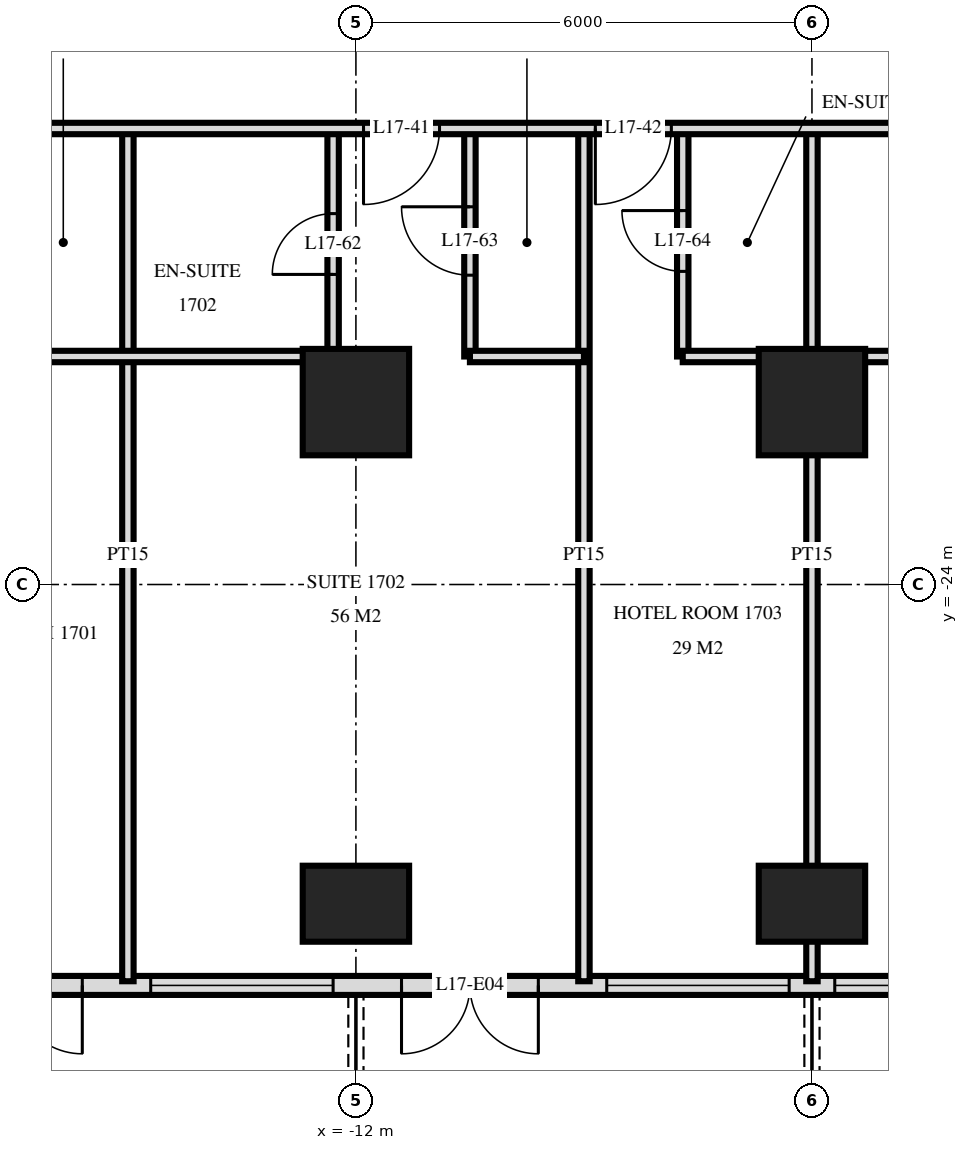
"""IFC4 building model, lengths in metres.
Left out: names, types, materials, properties, quantities, classifications, styles, units other than length and angle.
Written with IfcOpenShell. Run it as: python <this file> out.ifc"""

import sys

from ifc_helpers import new_model, si_unit, direction, frame, frame_2d, origin, origin_2d, place, context, subcontext, project, spatial, rectangle, extrude, element, fill, save


model = new_model("IFC4")
c1 = context("Model", 3, precision=1e-05, world=origin(), true_north=direction((0.0, 1.0)))
c2 = subcontext(c1, "Body", "Model", "MODEL_VIEW")
j1 = project(units=[si_unit("LENGTHUNIT", "METRE"), si_unit("PLANEANGLEUNIT", "RADIAN")], contexts=[c1])
p1 = place(None, origin())
s1 = spatial("IfcSite", under=j1, at=p1, CompositionType="ELEMENT")
p2 = place(p1, origin())
s2 = spatial("IfcBuilding", under=s1, at=p2, CompositionType="ELEMENT")
p3 = place(p2, frame((0.0, 0.0, 70.8)))
s3 = spatial("IfcBuildingStorey", under=s2, at=p3, CompositionType="ELEMENT", Elevation=70.8)
p4 = place(p3, frame((-12.0, -28.2, 0.0), z_axis=(0.0, 0.0, 1.0), x_axis=(1.0, 0.0, 0.0)))
e1 = element("IfcColumn", 1, at=p4, inside=s3, PredefinedType="COLUMN", context=c2, shape_type="SweptSolid", body=[
    extrude(rectangle(XDim=1.4, YDim=1.0, at=origin_2d()), origin(), (0.0, 0.0, 1.0), 3.6),
])
p5 = place(p3, frame((-12.0, -21.6, 0.0), z_axis=(0.0, 0.0, 1.0), x_axis=(1.0, 0.0, 0.0)))
e2 = element("IfcColumn", 2, at=p5, inside=s3, PredefinedType="COLUMN", context=c2, shape_type="SweptSolid", body=[
    extrude(rectangle(XDim=1.4, YDim=1.4, at=origin_2d()), origin(), (0.0, 0.0, 1.0), 3.6),
])
p6 = place(p3, frame((-6.0, -28.2, 0.0), z_axis=(0.0, 0.0, 1.0), x_axis=(1.0, 0.0, 0.0)))
e3 = element("IfcColumn", 3, at=p6, inside=s3, PredefinedType="COLUMN", context=c2, shape_type="SweptSolid", body=[
    extrude(rectangle(XDim=1.4, YDim=1.0, at=origin_2d()), origin(), (0.0, 0.0, 1.0), 3.6),
])
p7 = place(p3, frame((-6.0, -21.6, 0.0), z_axis=(0.0, 0.0, 1.0), x_axis=(1.0, 0.0, 0.0)))
e4 = element("IfcColumn", 4, at=p7, inside=s3, PredefinedType="COLUMN", context=c2, shape_type="SweptSolid", body=[
    extrude(rectangle(XDim=1.4, YDim=1.4, at=origin_2d()), origin(), (0.0, 0.0, 1.0), 3.6),
])
p8 = place(p3, frame((-28.775, -29.275, 0.0), z_axis=(0.0, 0.0, 1.0), x_axis=(1.0, 0.0, 0.0)))
e5 = element("IfcWall", 5, at=p8, inside=s3, PredefinedType="SOLIDWALL", context=c2, shape_type="SweptSolid", body=[
    extrude(rectangle(XDim=57.551, YDim=0.25, at=frame_2d((28.775, 0.0))), origin(), (0.0, 0.0, 1.0), 3.32),
])
p9 = place(p8, frame((0.575, 0.0, 0.0)))
e6 = element("IfcOpeningElement", 6, at=p9, cuts=e5, PredefinedType="OPENING", context=c2, shape_type="SweptSolid", body=[
    extrude(rectangle(XDim=1.8, YDim=2.4, at=frame_2d((0.9, 1.2))), frame((0.0, 0.135, 0.0), z_axis=(0.0, -1.0, 0.0), x_axis=(1.0, 0.0, 0.0)), (0.0, 0.0, 1.0), 0.27),
])
p10 = place(p8, frame((5.075, 0.0, 0.3)))
e7 = element("IfcOpeningElement", 7, at=p10, cuts=e5, PredefinedType="OPENING", context=c2, shape_type="SweptSolid", body=[
    extrude(rectangle(XDim=2.4, YDim=2.1, at=frame_2d((1.2, 1.05))), frame((0.0, 0.135, 0.0), z_axis=(0.0, -1.0, 0.0), x_axis=(1.0, 0.0, 0.0)), (0.0, 0.0, 1.0), 0.27),
])
p11 = place(p8, frame((8.375, 0.0, 0.0)))
e8 = element("IfcOpeningElement", 8, at=p11, cuts=e5, PredefinedType="OPENING", context=c2, shape_type="SweptSolid", body=[
    extrude(rectangle(XDim=1.8, YDim=2.4, at=frame_2d((0.9, 1.2))), frame((0.0, 0.135, 0.0), z_axis=(0.0, -1.0, 0.0), x_axis=(1.0, 0.0, 0.0)), (0.0, 0.0, 1.0), 0.27),
])
p12 = place(p8, frame((11.375, 0.0, 0.0)))
e9 = element("IfcOpeningElement", 9, at=p12, cuts=e5, PredefinedType="OPENING", context=c2, shape_type="SweptSolid", body=[
    extrude(rectangle(XDim=1.8, YDim=2.4, at=frame_2d((0.9, 1.2))), frame((0.0, 0.135, 0.0), z_axis=(0.0, -1.0, 0.0), x_axis=(1.0, 0.0, 0.0)), (0.0, 0.0, 1.0), 0.27),
])
p13 = place(p8, frame((14.075, 0.0, 0.3)))
e10 = element("IfcOpeningElement", 10, at=p13, cuts=e5, PredefinedType="OPENING", context=c2, shape_type="SweptSolid", body=[
    extrude(rectangle(XDim=2.4, YDim=2.1, at=frame_2d((1.2, 1.05))), frame((0.0, 0.135, 0.0), z_axis=(0.0, -1.0, 0.0), x_axis=(1.0, 0.0, 0.0)), (0.0, 0.0, 1.0), 0.27),
])
p14 = place(p8, frame((17.375, 0.0, 0.0)))
e11 = element("IfcOpeningElement", 11, at=p14, cuts=e5, PredefinedType="OPENING", context=c2, shape_type="SweptSolid", body=[
    extrude(rectangle(XDim=1.8, YDim=2.4, at=frame_2d((0.9, 1.2))), frame((0.0, 0.135, 0.0), z_axis=(0.0, -1.0, 0.0), x_axis=(1.0, 0.0, 0.0)), (0.0, 0.0, 1.0), 0.27),
])
p15 = place(p8, frame((20.075, 0.0, 0.3)))
e12 = element("IfcOpeningElement", 12, at=p15, cuts=e5, PredefinedType="OPENING", context=c2, shape_type="SweptSolid", body=[
    extrude(rectangle(XDim=2.4, YDim=2.1, at=frame_2d((1.2, 1.05))), frame((0.0, 0.135, 0.0), z_axis=(0.0, -1.0, 0.0), x_axis=(1.0, 0.0, 0.0)), (0.0, 0.0, 1.0), 0.27),
])
p16 = place(p8, frame((23.075, 0.0, 0.3)))
e13 = element("IfcOpeningElement", 13, at=p16, cuts=e5, PredefinedType="OPENING", context=c2, shape_type="SweptSolid", body=[
    extrude(rectangle(XDim=2.4, YDim=2.1, at=frame_2d((1.2, 1.05))), frame((0.0, 0.135, 0.0), z_axis=(0.0, -1.0, 0.0), x_axis=(1.0, 0.0, 0.0)), (0.0, 0.0, 1.0), 0.27),
])
p17 = place(p8, frame((26.375, 0.0, 0.0)))
e14 = element("IfcOpeningElement", 14, at=p17, cuts=e5, PredefinedType="OPENING", context=c2, shape_type="SweptSolid", body=[
    extrude(rectangle(XDim=1.8, YDim=2.4, at=frame_2d((0.9, 1.2))), frame((0.0, 0.135, 0.0), z_axis=(0.0, -1.0, 0.0), x_axis=(1.0, 0.0, 0.0)), (0.0, 0.0, 1.0), 0.27),
])
p18 = place(p8, frame((29.375, 0.0, 0.0)))
e15 = element("IfcOpeningElement", 15, at=p18, cuts=e5, PredefinedType="OPENING", context=c2, shape_type="SweptSolid", body=[
    extrude(rectangle(XDim=1.8, YDim=2.4, at=frame_2d((0.9, 1.2))), frame((0.0, 0.135, 0.0), z_axis=(0.0, -1.0, 0.0), x_axis=(1.0, 0.0, 0.0)), (0.0, 0.0, 1.0), 0.27),
])
p19 = place(p8, frame((32.075, 0.0, 0.3)))
e16 = element("IfcOpeningElement", 16, at=p19, cuts=e5, PredefinedType="OPENING", context=c2, shape_type="SweptSolid", body=[
    extrude(rectangle(XDim=2.4, YDim=2.1, at=frame_2d((1.2, 1.05))), frame((0.0, 0.135, 0.0), z_axis=(0.0, -1.0, 0.0), x_axis=(1.0, 0.0, 0.0)), (0.0, 0.0, 1.0), 0.27),
])
p20 = place(p8, frame((35.375, 0.0, 0.0)))
e17 = element("IfcOpeningElement", 17, at=p20, cuts=e5, PredefinedType="OPENING", context=c2, shape_type="SweptSolid", body=[
    extrude(rectangle(XDim=1.8, YDim=2.4, at=frame_2d((0.9, 1.2))), frame((0.0, 0.135, 0.0), z_axis=(0.0, -1.0, 0.0), x_axis=(1.0, 0.0, 0.0)), (0.0, 0.0, 1.0), 0.27),
])
p21 = place(p8, frame((38.075, 0.0, 0.3)))
e18 = element("IfcOpeningElement", 18, at=p21, cuts=e5, PredefinedType="OPENING", context=c2, shape_type="SweptSolid", body=[
    extrude(rectangle(XDim=2.4, YDim=2.1, at=frame_2d((1.2, 1.05))), frame((0.0, 0.135, 0.0), z_axis=(0.0, -1.0, 0.0), x_axis=(1.0, 0.0, 0.0)), (0.0, 0.0, 1.0), 0.27),
])
p22 = place(p8, frame((41.075, 0.0, 0.3)))
e19 = element("IfcOpeningElement", 19, at=p22, cuts=e5, PredefinedType="OPENING", context=c2, shape_type="SweptSolid", body=[
    extrude(rectangle(XDim=2.4, YDim=2.1, at=frame_2d((1.2, 1.05))), frame((0.0, 0.135, 0.0), z_axis=(0.0, -1.0, 0.0), x_axis=(1.0, 0.0, 0.0)), (0.0, 0.0, 1.0), 0.27),
])
p23 = place(p8, frame((44.375, 0.0, 0.0)))
e20 = element("IfcOpeningElement", 20, at=p23, cuts=e5, PredefinedType="OPENING", context=c2, shape_type="SweptSolid", body=[
    extrude(rectangle(XDim=1.8, YDim=2.4, at=frame_2d((0.9, 1.2))), frame((0.0, 0.135, 0.0), z_axis=(0.0, -1.0, 0.0), x_axis=(1.0, 0.0, 0.0)), (0.0, 0.0, 1.0), 0.27),
])
p24 = place(p8, frame((47.075, 0.0, 0.3)))
e21 = element("IfcOpeningElement", 21, at=p24, cuts=e5, PredefinedType="OPENING", context=c2, shape_type="SweptSolid", body=[
    extrude(rectangle(XDim=2.4, YDim=2.1, at=frame_2d((1.2, 1.05))), frame((0.0, 0.135, 0.0), z_axis=(0.0, -1.0, 0.0), x_axis=(1.0, 0.0, 0.0)), (0.0, 0.0, 1.0), 0.27),
])
p25 = place(p8, frame((50.375, 0.0, 0.0)))
e22 = element("IfcOpeningElement", 22, at=p25, cuts=e5, PredefinedType="OPENING", context=c2, shape_type="SweptSolid", body=[
    extrude(rectangle(XDim=1.8, YDim=2.4, at=frame_2d((0.9, 1.2))), frame((0.0, 0.135, 0.0), z_axis=(0.0, -1.0, 0.0), x_axis=(1.0, 0.0, 0.0)), (0.0, 0.0, 1.0), 0.27),
])
p26 = place(p8, frame((53.375, 0.0, 0.0)))
e23 = element("IfcOpeningElement", 23, at=p26, cuts=e5, PredefinedType="OPENING", context=c2, shape_type="SweptSolid", body=[
    extrude(rectangle(XDim=1.8, YDim=2.4, at=frame_2d((0.9, 1.2))), frame((0.0, 0.135, 0.0), z_axis=(0.0, -1.0, 0.0), x_axis=(1.0, 0.0, 0.0)), (0.0, 0.0, 1.0), 0.27),
])
p27 = place(p3, frame((-6.0, -29.22, 0.0), z_axis=(0.0, 0.0, 1.0), x_axis=(0.0, 1.0, 0.0)))
e24 = element("IfcWall", 24, at=p27, inside=s3, PredefinedType="PARTITIONING", context=c2, shape_type="SweptSolid", body=[
    extrude(rectangle(XDim=11.22, YDim=0.15, at=frame_2d((5.61, 0.0))), origin(), (0.0, 0.0, 1.0), 3.32),
])
p28 = place(p3, frame((-7.7, -21.0, 0.0), z_axis=(0.0, 0.0, 1.0), x_axis=(0.0, 1.0, 0.0)))
e25 = element("IfcWall", 25, at=p28, inside=s3, PredefinedType="PARTITIONING", context=c2, shape_type="SweptSolid", body=[
    extrude(rectangle(XDim=3.0, YDim=0.15, at=frame_2d((1.5, 0.0))), origin(), (0.0, 0.0, 1.0), 3.32),
])
p29 = place(p28, frame((1.12, 0.0, 0.0)))
e26 = element("IfcOpeningElement", 26, at=p29, cuts=e25, PredefinedType="OPENING", context=c2, shape_type="SweptSolid", body=[
    extrude(rectangle(XDim=0.8, YDim=2.1, at=frame_2d((0.4, 1.05))), frame((0.0, 0.085, 0.0), z_axis=(0.0, -1.0, 0.0), x_axis=(1.0, 0.0, 0.0)), (0.0, 0.0, 1.0), 0.17),
])
p30 = place(p3, frame((-9.0, -29.22, 0.0), z_axis=(0.0, 0.0, 1.0), x_axis=(0.0, 1.0, 0.0)))
e27 = element("IfcWall", 27, at=p30, inside=s3, PredefinedType="PARTITIONING", context=c2, shape_type="SweptSolid", body=[
    extrude(rectangle(XDim=11.22, YDim=0.15, at=frame_2d((5.61, 0.0))), origin(), (0.0, 0.0, 1.0), 3.32),
])
p31 = place(p3, frame((-10.5, -21.0, 0.0), z_axis=(0.0, 0.0, 1.0), x_axis=(0.0, 1.0, 0.0)))
e28 = element("IfcWall", 28, at=p31, inside=s3, PredefinedType="PARTITIONING", context=c2, shape_type="SweptSolid", body=[
    extrude(rectangle(XDim=3.0, YDim=0.15, at=frame_2d((1.5, 0.0))), origin(), (0.0, 0.0, 1.0), 3.32),
])
p32 = place(p31, frame((1.07, 0.0, 0.0)))
e29 = element("IfcOpeningElement", 29, at=p32, cuts=e28, PredefinedType="OPENING", context=c2, shape_type="SweptSolid", body=[
    extrude(rectangle(XDim=0.9, YDim=2.1, at=frame_2d((0.45, 1.05))), frame((0.0, 0.085, 0.0), z_axis=(0.0, -1.0, 0.0), x_axis=(1.0, 0.0, 0.0)), (0.0, 0.0, 1.0), 0.17),
])
p33 = place(p3, frame((-12.3, -21.0, 0.0), z_axis=(0.0, 0.0, 1.0), x_axis=(0.0, 1.0, 0.0)))
e30 = element("IfcWall", 30, at=p33, inside=s3, PredefinedType="PARTITIONING", context=c2, shape_type="SweptSolid", body=[
    extrude(rectangle(XDim=3.0, YDim=0.15, at=frame_2d((1.5, 0.0))), origin(), (0.0, 0.0, 1.0), 3.32),
])
p34 = place(p33, frame((1.08, 0.0, 0.0)))
e31 = element("IfcOpeningElement", 31, at=p34, cuts=e30, PredefinedType="OPENING", context=c2, shape_type="SweptSolid", body=[
    extrude(rectangle(XDim=0.8, YDim=2.1, at=frame_2d((0.4, 1.05))), frame((0.0, 0.085, 0.0), z_axis=(0.0, -1.0, 0.0), x_axis=(1.0, 0.0, 0.0)), (0.0, 0.0, 1.0), 0.17),
])
p35 = place(p3, frame((-15.0, -29.22, 0.0), z_axis=(0.0, 0.0, 1.0), x_axis=(0.0, 1.0, 0.0)))
e32 = element("IfcWall", 32, at=p35, inside=s3, PredefinedType="PARTITIONING", context=c2, shape_type="SweptSolid", body=[
    extrude(rectangle(XDim=11.22, YDim=0.15, at=frame_2d((5.61, 0.0))), origin(), (0.0, 0.0, 1.0), 3.32),
])
p36 = place(p3, frame((-16.7, -21.0, 0.0), z_axis=(0.0, 0.0, 1.0), x_axis=(1.0, 0.0, 0.0)))
e33 = element("IfcWall", 33, at=p36, inside=s3, PredefinedType="PARTITIONING", context=c2, shape_type="SweptSolid", body=[
    extrude(rectangle(XDim=4.4, YDim=0.15, at=frame_2d((2.2, 0.0))), origin(), (0.0, 0.0, 1.0), 3.32),
])
p37 = place(p3, frame((-10.5, -21.0, 0.0), z_axis=(0.0, 0.0, 1.0), x_axis=(1.0, 0.0, 0.0)))
e34 = element("IfcWall", 34, at=p37, inside=s3, PredefinedType="PARTITIONING", context=c2, shape_type="SweptSolid", body=[
    extrude(rectangle(XDim=1.5, YDim=0.15, at=frame_2d((0.75, 0.0))), origin(), (0.0, 0.0, 1.0), 3.32),
])
p38 = place(p3, frame((-7.7, -21.0, 0.0), z_axis=(0.0, 0.0, 1.0), x_axis=(1.0, 0.0, 0.0)))
e35 = element("IfcWall", 35, at=p38, inside=s3, PredefinedType="PARTITIONING", context=c2, shape_type="SweptSolid", body=[
    extrude(rectangle(XDim=4.4, YDim=0.15, at=frame_2d((2.2, 0.0))), origin(), (0.0, 0.0, 1.0), 3.32),
])
p39 = place(p3, frame((-33.12, -18.0, 0.0), z_axis=(0.0, 0.0, 1.0), x_axis=(1.0, 0.0, 0.0)))
e36 = element("IfcWall", 36, at=p39, inside=s3, PredefinedType="PARTITIONING", context=c2, shape_type="SweptSolid", body=[
    extrude(rectangle(XDim=66.24, YDim=0.15, at=frame_2d((33.12, 0.0))), origin(), (0.0, 0.0, 1.0), 3.32),
])
p40 = place(p39, frame((15.27, 0.0, 0.0)))
e37 = element("IfcOpeningElement", 37, at=p40, cuts=e36, PredefinedType="OPENING", context=c2, shape_type="SweptSolid", body=[
    extrude(rectangle(XDim=1.0, YDim=2.1, at=frame_2d((0.5, 1.05))), frame((0.0, 0.085, 0.0), z_axis=(0.0, -1.0, 0.0), x_axis=(1.0, 0.0, 0.0)), (0.0, 0.0, 1.0), 0.17),
])
p41 = place(p39, frame((21.22, 0.0, 0.0)))
e38 = element("IfcOpeningElement", 38, at=p41, cuts=e36, PredefinedType="OPENING", context=c2, shape_type="SweptSolid", body=[
    extrude(rectangle(XDim=1.0, YDim=2.1, at=frame_2d((0.5, 1.05))), frame((0.0, 0.085, 0.0), z_axis=(0.0, -1.0, 0.0), x_axis=(1.0, 0.0, 0.0)), (0.0, 0.0, 1.0), 0.17),
])
p42 = place(p39, frame((24.27, 0.0, 0.0)))
e39 = element("IfcOpeningElement", 39, at=p42, cuts=e36, PredefinedType="OPENING", context=c2, shape_type="SweptSolid", body=[
    extrude(rectangle(XDim=1.0, YDim=2.1, at=frame_2d((0.5, 1.05))), frame((0.0, 0.085, 0.0), z_axis=(0.0, -1.0, 0.0), x_axis=(1.0, 0.0, 0.0)), (0.0, 0.0, 1.0), 0.17),
])
p43 = place(p39, frame((30.97, 0.0, 0.0)))
e40 = element("IfcOpeningElement", 40, at=p43, cuts=e36, PredefinedType="OPENING", context=c2, shape_type="SweptSolid", body=[
    extrude(rectangle(XDim=1.0, YDim=2.1, at=frame_2d((0.5, 1.05))), frame((0.0, 0.085, 0.0), z_axis=(0.0, -1.0, 0.0), x_axis=(1.0, 0.0, 0.0)), (0.0, 0.0, 1.0), 0.17),
])
p44 = place(p39, frame((40.42, 0.0, 0.0)))
e41 = element("IfcOpeningElement", 41, at=p44, cuts=e36, PredefinedType="OPENING", context=c2, shape_type="SweptSolid", body=[
    extrude(rectangle(XDim=1.0, YDim=2.1, at=frame_2d((0.5, 1.05))), frame((0.0, 0.085, 0.0), z_axis=(0.0, -1.0, 0.0), x_axis=(1.0, 0.0, 0.0)), (0.0, 0.0, 1.0), 0.17),
])
p45 = place(p39, frame((43.97, 0.0, 0.0)))
e42 = element("IfcOpeningElement", 42, at=p45, cuts=e36, PredefinedType="OPENING", context=c2, shape_type="SweptSolid", body=[
    extrude(rectangle(XDim=1.0, YDim=2.1, at=frame_2d((0.5, 1.05))), frame((0.0, 0.085, 0.0), z_axis=(0.0, -1.0, 0.0), x_axis=(1.0, 0.0, 0.0)), (0.0, 0.0, 1.0), 0.17),
])
p46 = place(p39, frame((45.52, 0.0, 0.0)))
e43 = element("IfcOpeningElement", 43, at=p46, cuts=e36, PredefinedType="OPENING", context=c2, shape_type="SweptSolid", body=[
    extrude(rectangle(XDim=1.0, YDim=2.1, at=frame_2d((0.5, 1.05))), frame((0.0, 0.085, 0.0), z_axis=(0.0, -1.0, 0.0), x_axis=(1.0, 0.0, 0.0)), (0.0, 0.0, 1.0), 0.17),
])
p47 = place(p39, frame((52.97, 0.0, 0.0)))
e44 = element("IfcOpeningElement", 44, at=p47, cuts=e36, PredefinedType="OPENING", context=c2, shape_type="SweptSolid", body=[
    extrude(rectangle(XDim=1.0, YDim=2.1, at=frame_2d((0.5, 1.05))), frame((0.0, 0.085, 0.0), z_axis=(0.0, -1.0, 0.0), x_axis=(1.0, 0.0, 0.0)), (0.0, 0.0, 1.0), 0.17),
])
p48 = place(p39, frame((54.27, 0.0, 0.0)))
e45 = element("IfcOpeningElement", 45, at=p48, cuts=e36, PredefinedType="OPENING", context=c2, shape_type="SweptSolid", body=[
    extrude(rectangle(XDim=1.0, YDim=2.1, at=frame_2d((0.5, 1.05))), frame((0.0, 0.085, 0.0), z_axis=(0.0, -1.0, 0.0), x_axis=(1.0, 0.0, 0.0)), (0.0, 0.0, 1.0), 0.17),
])
p49 = place(p39, frame((13.42, 0.0, 0.0)))
e46 = element("IfcOpeningElement", 46, at=p49, cuts=e36, PredefinedType="OPENING", context=c2, shape_type="SweptSolid", body=[
    extrude(rectangle(XDim=1.0, YDim=2.1, at=frame_2d((0.5, 1.05))), frame((0.0, 0.085, 0.0), z_axis=(0.0, -1.0, 0.0), x_axis=(1.0, 0.0, 0.0)), (0.0, 0.0, 1.0), 0.17),
])
p50 = place(p39, frame((60.82, 0.0, 0.0)))
e47 = element("IfcOpeningElement", 47, at=p50, cuts=e36, PredefinedType="OPENING", context=c2, shape_type="SweptSolid", body=[
    extrude(rectangle(XDim=1.0, YDim=2.1, at=frame_2d((0.5, 1.05))), frame((0.0, 0.085, 0.0), z_axis=(0.0, -1.0, 0.0), x_axis=(1.0, 0.0, 0.0)), (0.0, 0.0, 1.0), 0.17),
])
p51 = place(p12, frame((0.9, 0.0, 0.0), z_axis=(0.0, 0.0, 1.0), x_axis=(-1.0, 0.0, 0.0)))
e48 = element("IfcDoor", 48, at=p51, inside=s3, OperationType="DOUBLE_DOOR_SINGLE_SWING", PredefinedType="DOOR", context=c2, shape_type="SweptSolid", body=[
    extrude(rectangle(XDim=1.8, YDim=2.4, at=frame_2d((0.0, 1.2))), frame((0.0, -0.025, 0.0), z_axis=(0.0, 1.0, 0.0), x_axis=(-1.0, 0.0, 0.0)), (0.0, 0.0, 1.0), 0.05),
])
fill(e9, e48)
p52 = place(p13, origin())
e49 = element("IfcWindow", 49, at=p52, inside=s3, PartitioningType="SINGLE_PANEL", PredefinedType="WINDOW", context=c2, shape_type="SweptSolid", body=[
    extrude(rectangle(XDim=2.4, YDim=2.1, at=frame_2d((1.2, 1.05))), frame((0.0, 0.03, 0.0), z_axis=(0.0, -1.0, 0.0), x_axis=(1.0, 0.0, 0.0)), (0.0, 0.0, 1.0), 0.06),
])
fill(e10, e49)
p53 = place(p14, frame((0.9, 0.0, 0.0), z_axis=(0.0, 0.0, 1.0), x_axis=(-1.0, 0.0, 0.0)))
e50 = element("IfcDoor", 50, at=p53, inside=s3, OperationType="DOUBLE_DOOR_SINGLE_SWING", PredefinedType="DOOR", context=c2, shape_type="SweptSolid", body=[
    extrude(rectangle(XDim=1.8, YDim=2.4, at=frame_2d((0.0, 1.2))), frame((0.0, -0.025, 0.0), z_axis=(0.0, 1.0, 0.0), x_axis=(-1.0, 0.0, 0.0)), (0.0, 0.0, 1.0), 0.05),
])
fill(e11, e50)
p54 = place(p15, origin())
e51 = element("IfcWindow", 51, at=p54, inside=s3, PartitioningType="SINGLE_PANEL", PredefinedType="WINDOW", context=c2, shape_type="SweptSolid", body=[
    extrude(rectangle(XDim=2.4, YDim=2.1, at=frame_2d((1.2, 1.05))), frame((0.0, 0.03, 0.0), z_axis=(0.0, -1.0, 0.0), x_axis=(1.0, 0.0, 0.0)), (0.0, 0.0, 1.0), 0.06),
])
fill(e12, e51)
p55 = place(p16, origin())
e52 = element("IfcWindow", 52, at=p55, inside=s3, PartitioningType="SINGLE_PANEL", PredefinedType="WINDOW", context=c2, shape_type="SweptSolid", body=[
    extrude(rectangle(XDim=2.4, YDim=2.1, at=frame_2d((1.2, 1.05))), frame((0.0, 0.03, 0.0), z_axis=(0.0, -1.0, 0.0), x_axis=(1.0, 0.0, 0.0)), (0.0, 0.0, 1.0), 0.06),
])
fill(e13, e52)
p56 = place(p41, frame((0.5, 0.0, 0.0), z_axis=(0.0, 0.0, 1.0), x_axis=(-1.0, 0.0, 0.0)))
e53 = element("IfcDoor", 53, at=p56, inside=s3, OperationType="SINGLE_SWING_LEFT", PredefinedType="DOOR", context=c2, shape_type="SweptSolid", body=[
    extrude(rectangle(XDim=1.0, YDim=2.1, at=frame_2d((0.0, 1.05))), frame((0.0, -0.025, 0.0), z_axis=(0.0, 1.0, 0.0), x_axis=(-1.0, 0.0, 0.0)), (0.0, 0.0, 1.0), 0.05),
])
fill(e38, e53)
p57 = place(p42, frame((0.5, 0.0, 0.0), z_axis=(0.0, 0.0, 1.0), x_axis=(-1.0, 0.0, 0.0)))
e54 = element("IfcDoor", 54, at=p57, inside=s3, OperationType="SINGLE_SWING_LEFT", PredefinedType="DOOR", context=c2, shape_type="SweptSolid", body=[
    extrude(rectangle(XDim=1.0, YDim=2.1, at=frame_2d((0.0, 1.05))), frame((0.0, -0.025, 0.0), z_axis=(0.0, 1.0, 0.0), x_axis=(-1.0, 0.0, 0.0)), (0.0, 0.0, 1.0), 0.05),
])
fill(e39, e54)
p58 = place(p34, origin())
e55 = element("IfcDoor", 55, at=p58, inside=s3, OperationType="SINGLE_SWING_RIGHT", PredefinedType="DOOR", context=c2, shape_type="SweptSolid", body=[
    extrude(rectangle(XDim=0.8, YDim=2.1, at=frame_2d((0.4, 1.05))), frame((0.0, 0.025, 0.0), z_axis=(0.0, -1.0, 0.0), x_axis=(1.0, 0.0, 0.0)), (0.0, 0.0, 1.0), 0.05),
])
fill(e31, e55)
p59 = place(p32, origin())
e56 = element("IfcDoor", 56, at=p59, inside=s3, OperationType="SINGLE_SWING_LEFT", PredefinedType="DOOR", context=c2, shape_type="SweptSolid", body=[
    extrude(rectangle(XDim=0.9, YDim=2.1, at=frame_2d((0.45, 1.05))), frame((0.0, 0.025, 0.0), z_axis=(0.0, -1.0, 0.0), x_axis=(1.0, 0.0, 0.0)), (0.0, 0.0, 1.0), 0.05),
])
fill(e29, e56)
p60 = place(p29, origin())
e57 = element("IfcDoor", 57, at=p60, inside=s3, OperationType="SINGLE_SWING_LEFT", PredefinedType="DOOR", context=c2, shape_type="SweptSolid", body=[
    extrude(rectangle(XDim=0.8, YDim=2.1, at=frame_2d((0.4, 1.05))), frame((0.0, 0.025, 0.0), z_axis=(0.0, -1.0, 0.0), x_axis=(1.0, 0.0, 0.0)), (0.0, 0.0, 1.0), 0.05),
])
fill(e26, e57)
save(model, sys.argv[1])
